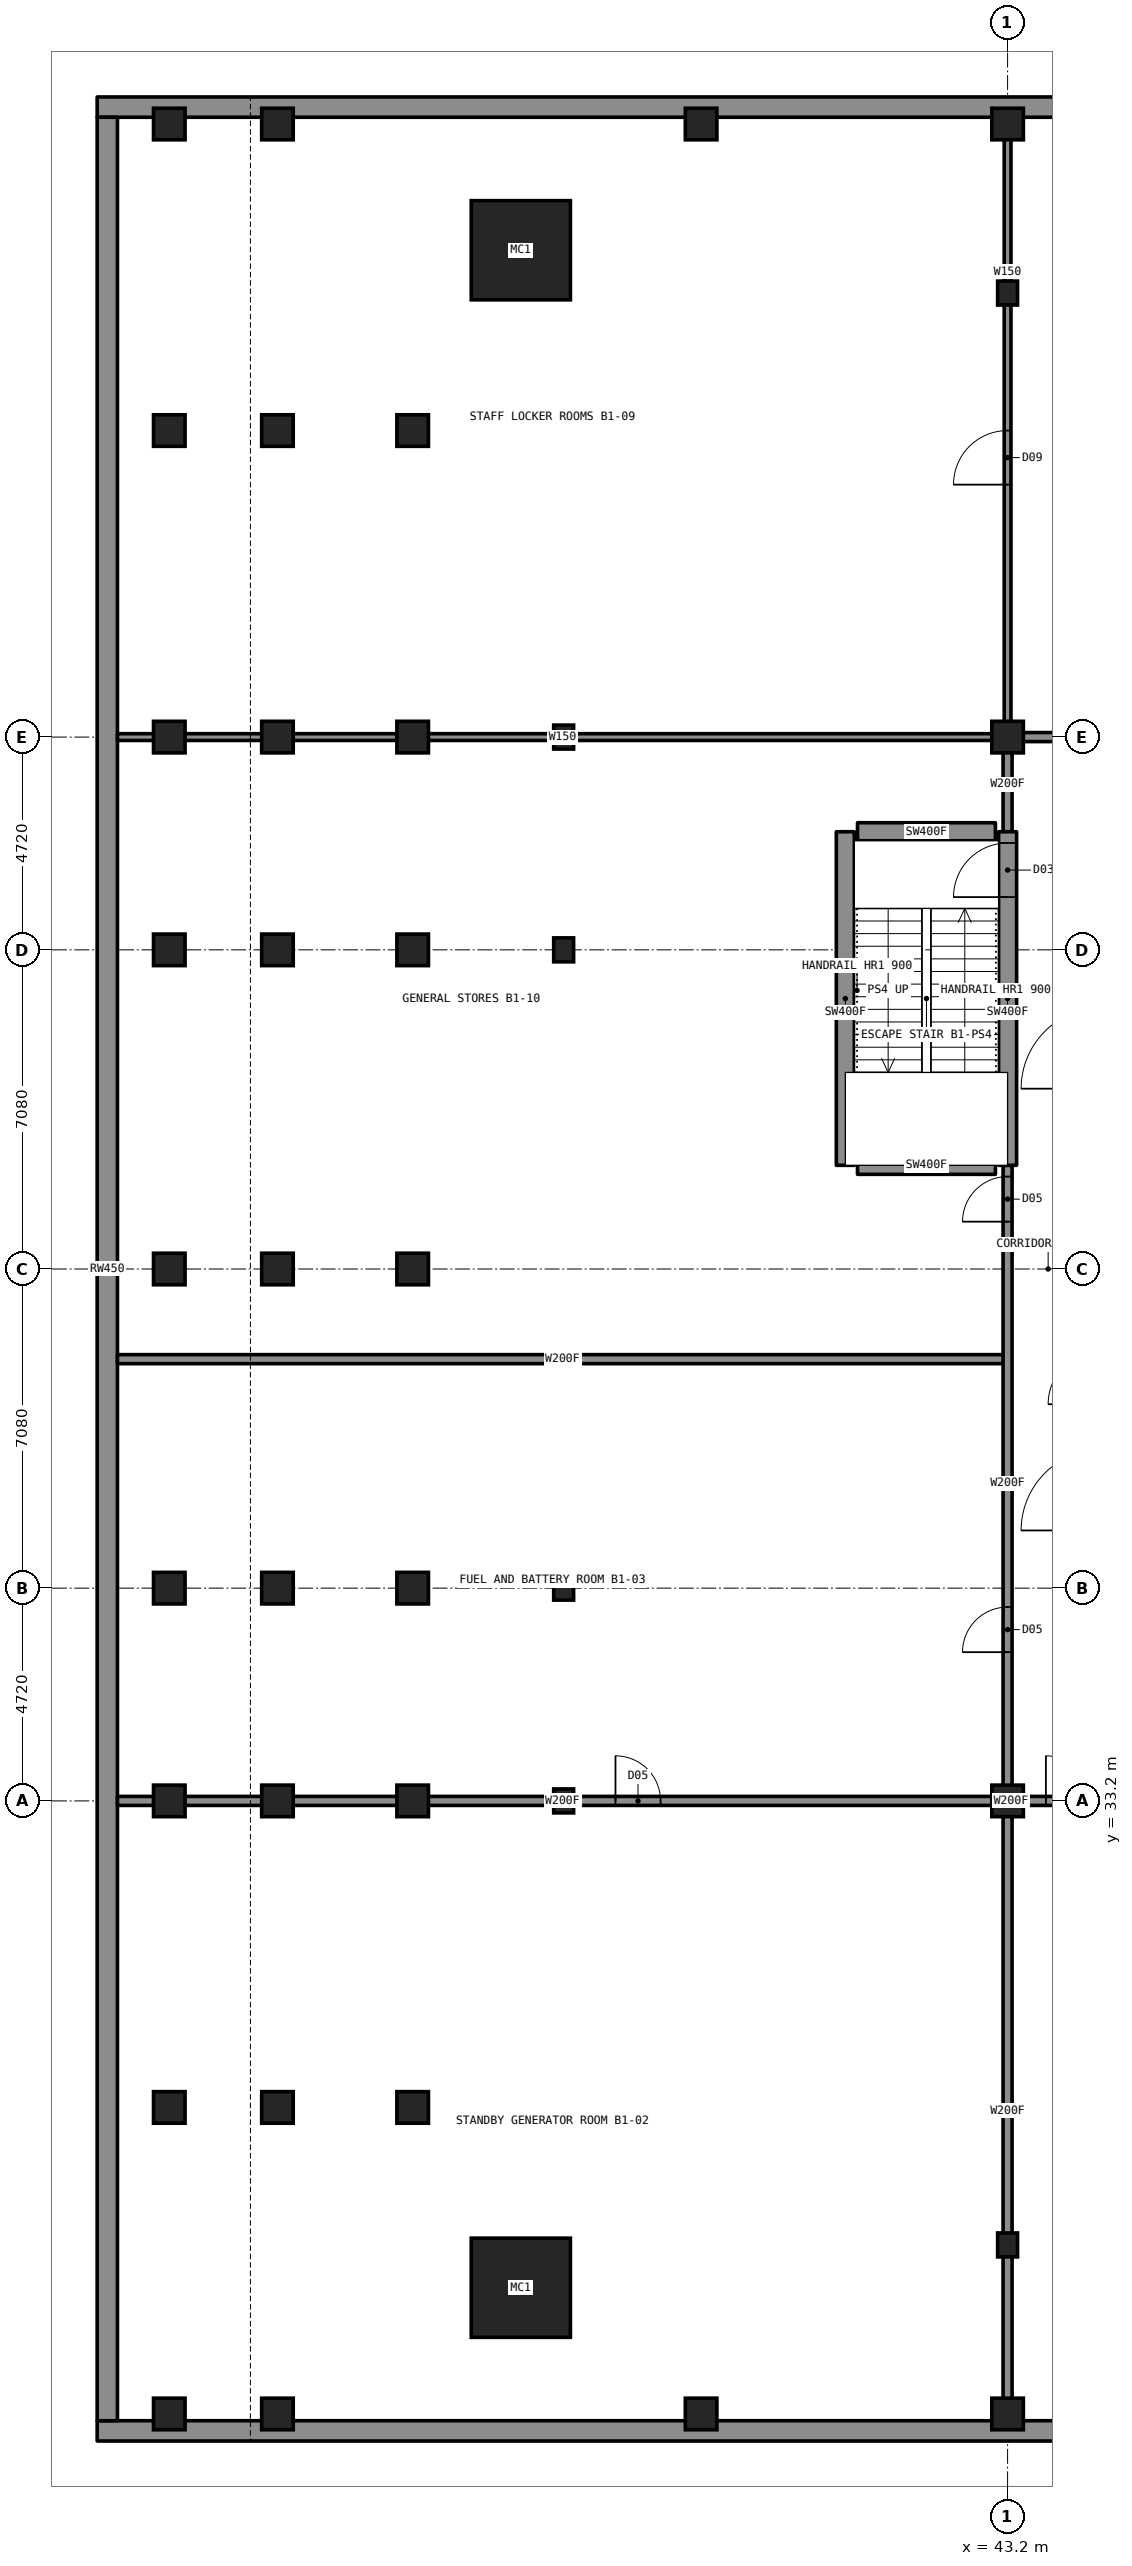
"""IFC4 building model, lengths in metres.
Left out: names, types, materials, properties, quantities, classifications, styles, units other than length and angle.
Written with IfcOpenShell. Run it as: python <this file> out.ifc"""

import sys

from ifc_helpers import new_model, si_unit, direction, frame, frame_2d, origin, origin_2d, place, context, subcontext, project, spatial, rectangle, hollow_rectangle, i_section, extrude, element, fill, save


model = new_model("IFC4")
c1 = context("Model", 3, precision=1e-05, world=origin(), true_north=direction((0.0, 1.0)))
c2 = subcontext(c1, "Body", "Model", "MODEL_VIEW")
j1 = project(units=[si_unit("LENGTHUNIT", "METRE"), si_unit("PLANEANGLEUNIT", "RADIAN")], contexts=[c1])
p1 = place(None, origin())
s1 = spatial("IfcSite", under=j1, at=p1, CompositionType="ELEMENT")
p2 = place(p1, origin())
s2 = spatial("IfcBuilding", under=s1, at=p2, CompositionType="ELEMENT")
p3 = place(p2, frame((0.0, 0.0, -5.0)))
s3 = spatial("IfcBuildingStorey", under=s2, at=p3, CompositionType="ELEMENT", Elevation=-5.0)
for number, where, z_axis, x_axis in (
    (1, (33.35, 33.2, 0.0), (0.0, 0.0, 1.0), (1.0, 0.0, 0.0)),
    (2, (33.35, 37.92, 0.0), (0.0, 0.0, 1.0), (1.0, 0.0, 0.0)),
    (3, (33.35, 52.08, 0.0), (0.0, 0.0, 1.0), (1.0, 0.0, 0.0)),
    (4, (33.35, 56.8, 0.0), (0.0, 0.0, 1.0), (1.0, 0.0, 0.0)),
    (5, (43.2, 23.35, 0.0), (0.0, 0.0, 1.0), (1.0, 0.0, 0.0)),
    (6, (43.2, 66.65, 0.0), (0.0, 0.0, 1.0), (1.0, 0.0, 0.0)),
):
    element("IfcColumn", number, at=place(p3, frame(where, z_axis=z_axis, x_axis=x_axis)), inside=s3, PredefinedType="COLUMN", context=c2, shape_type="SweptSolid", body=[
        extrude(i_section(OverallWidth=0.442, OverallDepth=0.531, WebThickness=0.066, FlangeThickness=0.106, at=origin_2d()), origin(), (0.0, 0.0, 1.0), 5.0),
    ])
for number, where, z_axis, x_axis in (
    (7, (43.2, 33.2, 0.0), (0.0, 0.0, 1.0), (1.0, 0.0, 0.0)),
    (8, (43.2, 56.8, 0.0), (0.0, 0.0, 1.0), (1.0, 0.0, 0.0)),
):
    element("IfcColumn", number, at=place(p3, frame(where, z_axis=z_axis, x_axis=x_axis)), inside=s3, PredefinedType="COLUMN", context=c2, shape_type="SweptSolid", body=[
        extrude(hollow_rectangle(XDim=0.7, YDim=0.7, WallThickness=0.06, at=origin_2d()), origin(), (0.0, 0.0, 1.0), 5.0),
    ])
for number, where, z_axis, x_axis in (
    (9, (32.4, 67.6, 0.0), (0.0, 0.0, 1.0), (1.0, 0.0, 0.0)),
    (10, (32.4, 22.4, 0.0), (0.0, 0.0, 1.0), (1.0, 0.0, 0.0)),
):
    element("IfcColumn", number, at=place(p3, frame(where, z_axis=z_axis, x_axis=x_axis)), inside=s3, PredefinedType="COLUMN", context=c2, shape_type="SweptSolid", body=[
        extrude(hollow_rectangle(XDim=2.2, YDim=2.2, WallThickness=0.15, at=origin_2d()), origin(), (0.0, 0.0, 1.0), 5.0),
    ])
for number, where, z_axis, x_axis in (
    (11, (24.6, 19.6, 0.0), (0.0, 0.0, 1.0), (1.0, 0.0, 0.0)),
    (12, (24.6, 26.4, 0.0), (0.0, 0.0, 1.0), (1.0, 0.0, 0.0)),
    (13, (24.6, 33.2, 0.0), (0.0, 0.0, 1.0), (1.0, 0.0, 0.0)),
    (14, (24.6, 37.92, 0.0), (0.0, 0.0, 1.0), (1.0, 0.0, 0.0)),
    (15, (24.6, 45.0, 0.0), (0.0, 0.0, 1.0), (1.0, 0.0, 0.0)),
    (16, (24.6, 52.08, 0.0), (0.0, 0.0, 1.0), (1.0, 0.0, 0.0)),
    (17, (24.6, 56.8, 0.0), (0.0, 0.0, 1.0), (1.0, 0.0, 0.0)),
    (18, (24.6, 63.6, 0.0), (0.0, 0.0, 1.0), (1.0, 0.0, 0.0)),
    (19, (24.6, 70.4, 0.0), (0.0, 0.0, 1.0), (1.0, 0.0, 0.0)),
    (20, (27.0, 19.6, 0.0), (0.0, 0.0, 1.0), (1.0, 0.0, 0.0)),
    (21, (27.0, 26.4, 0.0), (0.0, 0.0, 1.0), (1.0, 0.0, 0.0)),
    (22, (27.0, 33.2, 0.0), (0.0, 0.0, 1.0), (1.0, 0.0, 0.0)),
    (23, (27.0, 37.92, 0.0), (0.0, 0.0, 1.0), (1.0, 0.0, 0.0)),
    (24, (27.0, 45.0, 0.0), (0.0, 0.0, 1.0), (1.0, 0.0, 0.0)),
    (25, (27.0, 52.08, 0.0), (0.0, 0.0, 1.0), (1.0, 0.0, 0.0)),
    (26, (27.0, 56.8, 0.0), (0.0, 0.0, 1.0), (1.0, 0.0, 0.0)),
    (27, (27.0, 63.6, 0.0), (0.0, 0.0, 1.0), (1.0, 0.0, 0.0)),
    (28, (27.0, 70.4, 0.0), (0.0, 0.0, 1.0), (1.0, 0.0, 0.0)),
    (29, (30.0, 26.4, 0.0), (0.0, 0.0, 1.0), (1.0, 0.0, 0.0)),
    (30, (30.0, 33.2, 0.0), (0.0, 0.0, 1.0), (1.0, 0.0, 0.0)),
    (31, (30.0, 37.92, 0.0), (0.0, 0.0, 1.0), (1.0, 0.0, 0.0)),
    (32, (30.0, 45.0, 0.0), (0.0, 0.0, 1.0), (1.0, 0.0, 0.0)),
    (33, (30.0, 52.08, 0.0), (0.0, 0.0, 1.0), (1.0, 0.0, 0.0)),
    (34, (30.0, 56.8, 0.0), (0.0, 0.0, 1.0), (1.0, 0.0, 0.0)),
    (35, (30.0, 63.6, 0.0), (0.0, 0.0, 1.0), (1.0, 0.0, 0.0)),
    (36, (36.4, 19.6, 0.0), (0.0, 0.0, 1.0), (1.0, 0.0, 0.0)),
    (37, (36.4, 70.4, 0.0), (0.0, 0.0, 1.0), (1.0, 0.0, 0.0)),
    (38, (43.2, 19.6, 0.0), (0.0, 0.0, 1.0), (1.0, 0.0, 0.0)),
    (39, (43.2, 70.4, 0.0), (0.0, 0.0, 1.0), (1.0, 0.0, 0.0)),
):
    element("IfcColumn", number, at=place(p3, frame(where, z_axis=z_axis, x_axis=x_axis)), inside=s3, PredefinedType="COLUMN", context=c2, shape_type="SweptSolid", body=[
        extrude(rectangle(XDim=0.7, YDim=0.7, at=origin_2d()), origin(), (0.0, 0.0, 1.0), 5.0),
    ])
for number, where, z_axis, x_axis in (
    (40, (23.0, 70.775, 0.0), (0.0, 0.0, 1.0), (1.0, 0.0, 0.0)),
    (41, (23.0, 19.225, 0.0), (0.0, 0.0, 1.0), (1.0, 0.0, 0.0)),
):
    element("IfcWall", number, at=place(p3, frame(where, z_axis=z_axis, x_axis=x_axis)), inside=s3, PredefinedType="SOLIDWALL", context=c2, shape_type="SweptSolid", body=[
        extrude(rectangle(XDim=64.0, YDim=0.45, at=frame_2d((32.0, 0.0))), origin(), (0.0, 0.0, 1.0), 5.0),
    ])
p4 = place(p3, frame((23.225, 19.45, 0.0), z_axis=(0.0, 0.0, 1.0), x_axis=(0.0, 1.0, 0.0)))
e42 = element("IfcWall", 42, at=p4, inside=s3, PredefinedType="SOLIDWALL", context=c2, shape_type="SweptSolid", body=[
    extrude(rectangle(XDim=51.1, YDim=0.45, at=frame_2d((25.55, 0.0))), origin(), (0.0, 0.0, 1.0), 5.0),
])
p5 = place(p3, frame((43.2, 33.2, 0.0), z_axis=(0.0, 0.0, 1.0), x_axis=(1.0, 0.0, 0.0)))
e43 = element("IfcWall", 43, at=p5, inside=s3, PredefinedType="PARTITIONING", context=c2, shape_type="SweptSolid", body=[
    extrude(rectangle(XDim=2.1, YDim=0.2, at=frame_2d((1.05, 0.0))), origin(), (0.0, 0.0, 1.0), 4.6),
])
p6 = place(p5, frame((0.85, 0.0, 0.0)))
e44 = element("IfcOpeningElement", 44, at=p6, cuts=e43, PredefinedType="OPENING", context=c2, shape_type="SweptSolid", body=[
    extrude(rectangle(XDim=1.0, YDim=2.1, at=frame_2d((0.5, 1.05))), frame((0.0, 0.11, 0.0), z_axis=(0.0, -1.0, 0.0), x_axis=(1.0, 0.0, 0.0)), (0.0, 0.0, 1.0), 0.22),
])
p7 = place(p3, frame((23.45, 33.2, 0.0), z_axis=(0.0, 0.0, 1.0), x_axis=(1.0, 0.0, 0.0)))
e45 = element("IfcWall", 45, at=p7, inside=s3, PredefinedType="PARTITIONING", context=c2, shape_type="SweptSolid", body=[
    extrude(rectangle(XDim=19.75, YDim=0.2, at=frame_2d((9.875, 0.0))), origin(), (0.0, 0.0, 1.0), 4.6),
])
p8 = place(p7, frame((11.05, 0.0, 0.0)))
e46 = element("IfcOpeningElement", 46, at=p8, cuts=e45, PredefinedType="OPENING", context=c2, shape_type="SweptSolid", body=[
    extrude(rectangle(XDim=1.0, YDim=2.1, at=frame_2d((0.5, 1.05))), frame((0.0, 0.11, 0.0), z_axis=(0.0, -1.0, 0.0), x_axis=(1.0, 0.0, 0.0)), (0.0, 0.0, 1.0), 0.22),
])
p9 = place(p3, frame((23.45, 43.0, 0.0), z_axis=(0.0, 0.0, 1.0), x_axis=(1.0, 0.0, 0.0)))
e47 = element("IfcWall", 47, at=p9, inside=s3, PredefinedType="PARTITIONING", context=c2, shape_type="SweptSolid", body=[
    extrude(rectangle(XDim=19.75, YDim=0.2, at=frame_2d((9.875, 0.0))), origin(), (0.0, 0.0, 1.0), 4.6),
])
p10 = place(p3, frame((43.2, 56.8, 0.0), z_axis=(0.0, 0.0, 1.0), x_axis=(1.0, 0.0, 0.0)))
e48 = element("IfcWall", 48, at=p10, inside=s3, PredefinedType="PARTITIONING", context=c2, shape_type="SweptSolid", body=[
    extrude(rectangle(XDim=14.1, YDim=0.2, at=frame_2d((7.05, 0.0))), origin(), (0.0, 0.0, 1.0), 4.6),
])
p11 = place(p10, frame((5.3, 0.0, 0.0)))
e49 = element("IfcOpeningElement", 49, at=p11, cuts=e48, PredefinedType="OPENING", context=c2, shape_type="SweptSolid", body=[
    extrude(rectangle(XDim=1.0, YDim=2.1, at=frame_2d((0.5, 1.05))), frame((0.0, 0.11, 0.0), z_axis=(0.0, -1.0, 0.0), x_axis=(1.0, 0.0, 0.0)), (0.0, 0.0, 1.0), 0.22),
])
p12 = place(p3, frame((23.45, 56.8, 0.0), z_axis=(0.0, 0.0, 1.0), x_axis=(1.0, 0.0, 0.0)))
e50 = element("IfcWall", 50, at=p12, inside=s3, PredefinedType="PARTITIONING", context=c2, shape_type="SweptSolid", body=[
    extrude(rectangle(XDim=19.75, YDim=0.15, at=frame_2d((9.875, 0.0))), origin(), (0.0, 0.0, 1.0), 4.6),
])
for number, where, z_axis, x_axis in (
    (51, (39.87, 47.3, 0.0), (0.0, 0.0, 1.0), (1.0, 0.0, 0.0)),
    (52, (39.87, 54.7, 0.0), (0.0, 0.0, 1.0), (1.0, 0.0, 0.0)),
):
    element("IfcWall", number, at=place(p3, frame(where, z_axis=z_axis, x_axis=x_axis)), inside=s3, PredefinedType="SHEAR", context=c2, shape_type="SweptSolid", body=[
        extrude(rectangle(XDim=3.06, YDim=0.4, at=frame_2d((1.53, 0.0))), origin(), (0.0, 0.0, 1.0), 5.0),
    ])
p13 = place(p3, frame((43.2, 33.2, 0.0), z_axis=(0.0, 0.0, 1.0), x_axis=(0.0, 1.0, 0.0)))
e53 = element("IfcWall", 53, at=p13, inside=s3, PredefinedType="PARTITIONING", context=c2, shape_type="SweptSolid", body=[
    extrude(rectangle(XDim=14.1, YDim=0.2, at=frame_2d((7.05, 0.0))), origin(), (0.0, 0.0, 1.0), 4.6),
])
p14 = place(p13, frame((3.3, 0.0, 0.0)))
e54 = element("IfcOpeningElement", 54, at=p14, cuts=e53, PredefinedType="OPENING", context=c2, shape_type="SweptSolid", body=[
    extrude(rectangle(XDim=1.0, YDim=2.1, at=frame_2d((0.5, 1.05))), frame((0.0, 0.11, 0.0), z_axis=(0.0, -1.0, 0.0), x_axis=(1.0, 0.0, 0.0)), (0.0, 0.0, 1.0), 0.22),
])
p15 = place(p13, frame((12.85, 0.0, 0.0)))
e55 = element("IfcOpeningElement", 55, at=p15, cuts=e53, PredefinedType="OPENING", context=c2, shape_type="SweptSolid", body=[
    extrude(rectangle(XDim=1.0, YDim=2.1, at=frame_2d((0.5, 1.05))), frame((0.0, 0.11, 0.0), z_axis=(0.0, -1.0, 0.0), x_axis=(1.0, 0.0, 0.0)), (0.0, 0.0, 1.0), 0.22),
])
p16 = place(p3, frame((43.2, 54.7, 0.0), z_axis=(0.0, 0.0, 1.0), x_axis=(0.0, 1.0, 0.0)))
e56 = element("IfcWall", 56, at=p16, inside=s3, PredefinedType="PARTITIONING", context=c2, shape_type="SweptSolid", body=[
    extrude(rectangle(XDim=2.1, YDim=0.2, at=frame_2d((1.05, 0.0))), origin(), (0.0, 0.0, 1.0), 4.6),
])
p17 = place(p3, frame((43.2, 19.45, 0.0), z_axis=(0.0, 0.0, 1.0), x_axis=(0.0, 1.0, 0.0)))
e57 = element("IfcWall", 57, at=p17, inside=s3, PredefinedType="PARTITIONING", context=c2, shape_type="SweptSolid", body=[
    extrude(rectangle(XDim=13.75, YDim=0.2, at=frame_2d((6.875, 0.0))), origin(), (0.0, 0.0, 1.0), 4.6),
])
p18 = place(p3, frame((43.2, 56.8, 0.0), z_axis=(0.0, 0.0, 1.0), x_axis=(0.0, 1.0, 0.0)))
e58 = element("IfcWall", 58, at=p18, inside=s3, PredefinedType="PARTITIONING", context=c2, shape_type="SweptSolid", body=[
    extrude(rectangle(XDim=13.75, YDim=0.15, at=frame_2d((6.875, 0.0))), origin(), (0.0, 0.0, 1.0), 4.6),
])
p19 = place(p18, frame((5.6, 0.0, 0.0)))
e59 = element("IfcOpeningElement", 59, at=p19, cuts=e58, PredefinedType="OPENING", context=c2, shape_type="SweptSolid", body=[
    extrude(rectangle(XDim=1.2, YDim=2.2, at=frame_2d((0.6, 1.1))), frame((0.0, 0.085, 0.0), z_axis=(0.0, -1.0, 0.0), x_axis=(1.0, 0.0, 0.0)), (0.0, 0.0, 1.0), 0.17),
])
p20 = place(p3, frame((43.2, 47.3, 0.0), z_axis=(0.0, 0.0, 1.0), x_axis=(0.0, 1.0, 0.0)))
e60 = element("IfcWall", 60, at=p20, inside=s3, PredefinedType="SHEAR", context=c2, shape_type="SweptSolid", body=[
    extrude(rectangle(XDim=7.4, YDim=0.4, at=frame_2d((3.7, 0.0))), origin(), (0.0, 0.0, 1.0), 5.0),
])
p21 = place(p20, frame((5.95, 0.0, 0.0)))
e61 = element("IfcOpeningElement", 61, at=p21, cuts=e60, PredefinedType="OPENING", context=c2, shape_type="SweptSolid", body=[
    extrude(rectangle(XDim=1.2, YDim=2.2, at=frame_2d((0.6, 1.1))), frame((0.0, 0.21, 0.0), z_axis=(0.0, -1.0, 0.0), x_axis=(1.0, 0.0, 0.0)), (0.0, 0.0, 1.0), 0.42),
])
p22 = place(p3, frame((39.6, 47.3, 0.0), z_axis=(0.0, 0.0, 1.0), x_axis=(0.0, 1.0, 0.0)))
e62 = element("IfcWall", 62, at=p22, inside=s3, PredefinedType="SHEAR", context=c2, shape_type="SweptSolid", body=[
    extrude(rectangle(XDim=7.4, YDim=0.4, at=frame_2d((3.7, 0.0))), origin(), (0.0, 0.0, 1.0), 5.0),
])
p23 = place(p21, origin())
e63 = element("IfcDoor", 63, at=p23, inside=s3, OperationType="SINGLE_SWING_LEFT", PredefinedType="DOOR", context=c2, shape_type="SweptSolid", body=[
    extrude(rectangle(XDim=1.2, YDim=2.2, at=frame_2d((0.6, 1.1))), frame((0.0, 0.025, 0.0), z_axis=(0.0, -1.0, 0.0), x_axis=(1.0, 0.0, 0.0)), (0.0, 0.0, 1.0), 0.05),
])
fill(e61, e63)
p24 = place(p6, origin())
e64 = element("IfcDoor", 64, at=p24, inside=s3, OperationType="SINGLE_SWING_LEFT", PredefinedType="DOOR", context=c2, shape_type="SweptSolid", body=[
    extrude(rectangle(XDim=1.0, YDim=2.1, at=frame_2d((0.5, 1.05))), frame((0.0, 0.025, 0.0), z_axis=(0.0, -1.0, 0.0), x_axis=(1.0, 0.0, 0.0)), (0.0, 0.0, 1.0), 0.05),
])
fill(e44, e64)
p25 = place(p8, origin())
e65 = element("IfcDoor", 65, at=p25, inside=s3, OperationType="SINGLE_SWING_LEFT", PredefinedType="DOOR", context=c2, shape_type="SweptSolid", body=[
    extrude(rectangle(XDim=1.0, YDim=2.1, at=frame_2d((0.5, 1.05))), frame((0.0, 0.025, 0.0), z_axis=(0.0, -1.0, 0.0), x_axis=(1.0, 0.0, 0.0)), (0.0, 0.0, 1.0), 0.05),
])
fill(e46, e65)
p26 = place(p14, origin())
e66 = element("IfcDoor", 66, at=p26, inside=s3, OperationType="SINGLE_SWING_LEFT", PredefinedType="DOOR", context=c2, shape_type="SweptSolid", body=[
    extrude(rectangle(XDim=1.0, YDim=2.1, at=frame_2d((0.5, 1.05))), frame((0.0, 0.025, 0.0), z_axis=(0.0, -1.0, 0.0), x_axis=(1.0, 0.0, 0.0)), (0.0, 0.0, 1.0), 0.05),
])
fill(e54, e66)
p27 = place(p19, origin())
e67 = element("IfcDoor", 67, at=p27, inside=s3, OperationType="SINGLE_SWING_LEFT", PredefinedType="DOOR", context=c2, shape_type="SweptSolid", body=[
    extrude(rectangle(XDim=1.2, YDim=2.2, at=frame_2d((0.6, 1.1))), frame((0.0, 0.025, 0.0), z_axis=(0.0, -1.0, 0.0), x_axis=(1.0, 0.0, 0.0)), (0.0, 0.0, 1.0), 0.05),
])
fill(e59, e67)
p28 = place(p15, origin())
e68 = element("IfcDoor", 68, at=p28, inside=s3, OperationType="SINGLE_SWING_LEFT", PredefinedType="DOOR", context=c2, shape_type="SweptSolid", body=[
    extrude(rectangle(XDim=1.0, YDim=2.1, at=frame_2d((0.5, 1.05))), frame((0.0, 0.025, 0.0), z_axis=(0.0, -1.0, 0.0), x_axis=(1.0, 0.0, 0.0)), (0.0, 0.0, 1.0), 0.05),
])
fill(e55, e68)
save(model, sys.argv[1])
